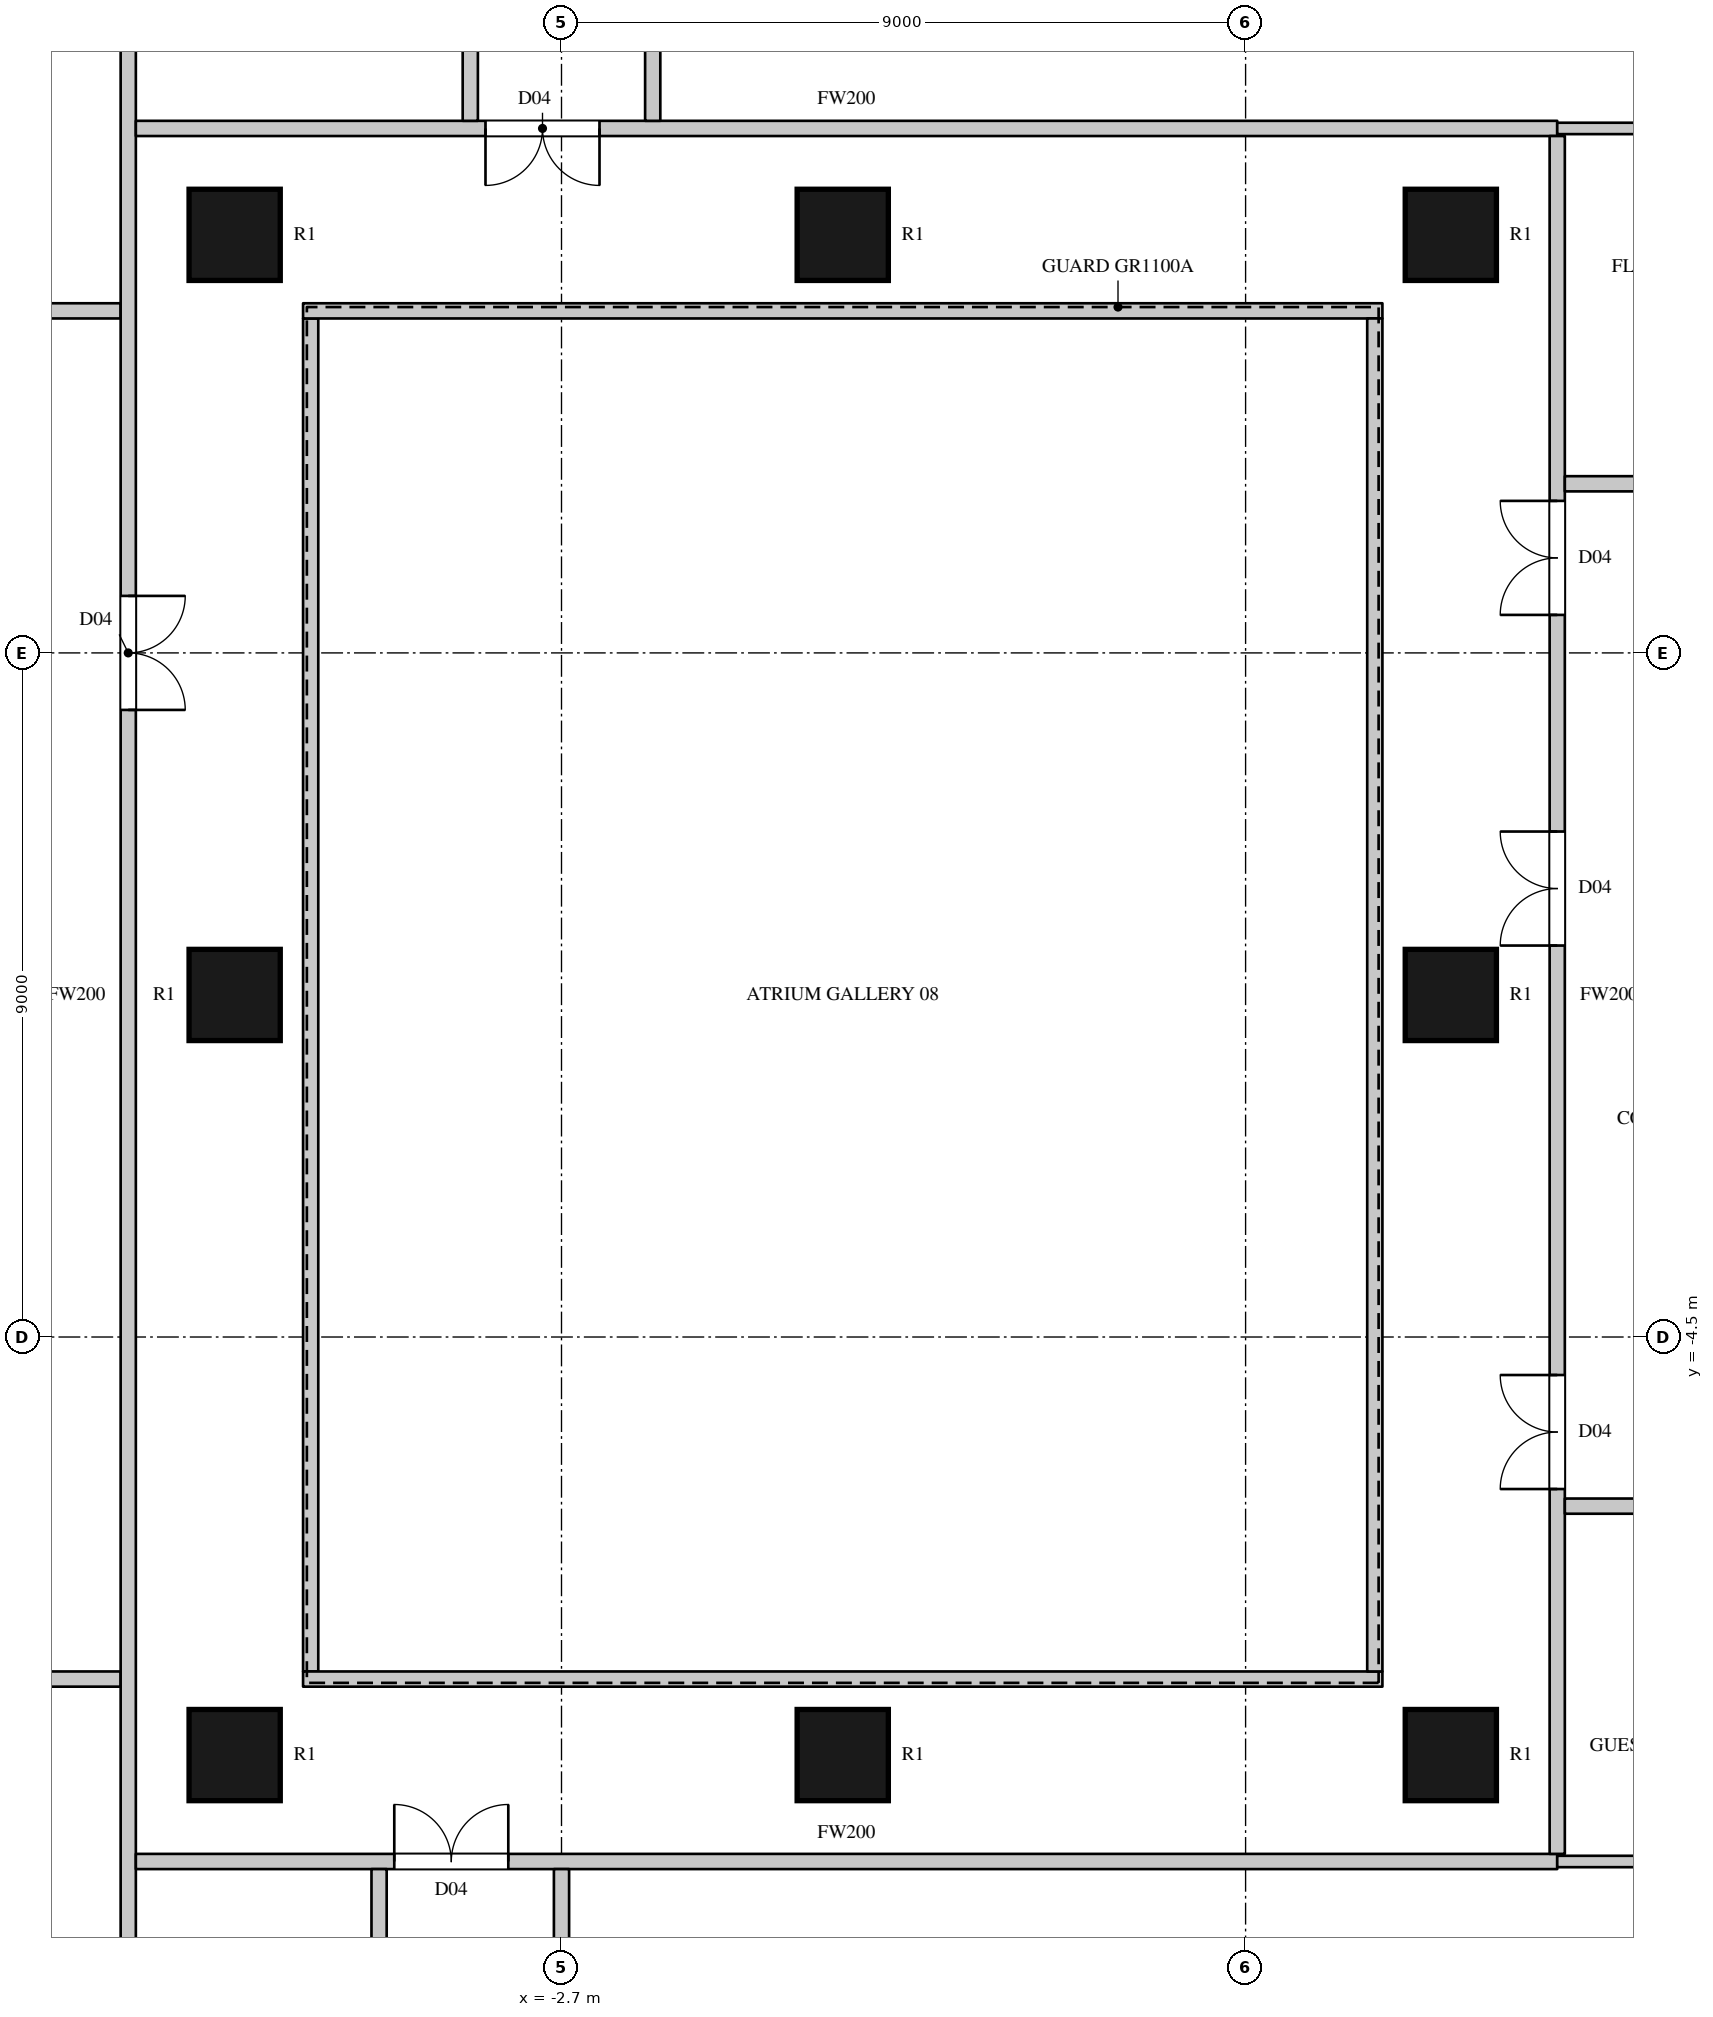
"""IFC4 building model, lengths in metres.
Left out: names, types, materials, properties, quantities, classifications, styles, units other than length and angle.
Written with IfcOpenShell. Run it as: python <this file> out.ifc"""

import sys

from ifc_helpers import new_model, si_unit, direction, frame, frame_2d, origin, origin_2d, place, context, subcontext, project, spatial, rectangle, circle, extrude, element, fill, save


model = new_model("IFC4")
c1 = context("Model", 3, precision=1e-05, world=origin(), true_north=direction((0.0, 1.0)))
c2 = subcontext(c1, "Body", "Model", "MODEL_VIEW")
j1 = project(units=[si_unit("LENGTHUNIT", "METRE"), si_unit("PLANEANGLEUNIT", "RADIAN")], contexts=[c1])
p1 = place(None, origin())
s1 = spatial("IfcSite", under=j1, at=p1, CompositionType="ELEMENT")
p2 = place(p1, origin())
s2 = spatial("IfcBuilding", under=s1, at=p2, CompositionType="ELEMENT")
p3 = place(p2, frame((0.0, 0.0, 59.1)))
s3 = spatial("IfcBuildingStorey", under=s2, at=p3, CompositionType="ELEMENT", Elevation=59.1)
for number, where, z_axis, x_axis in (
    (1, (-7.0, -10.0, 0.0), (0.0, 0.0, 1.0), (1.0, 0.0, 0.0)),
    (2, (-7.0, 0.0, 0.0), (0.0, 0.0, 1.0), (1.0, 0.0, 0.0)),
    (3, (-7.0, 10.0, 0.0), (0.0, 0.0, 1.0), (1.0, 0.0, 0.0)),
    (4, (1.0, -10.0, 0.0), (0.0, 0.0, 1.0), (1.0, 0.0, 0.0)),
    (5, (1.0, 10.0, 0.0), (0.0, 0.0, 1.0), (1.0, 0.0, 0.0)),
    (6, (9.0, -10.0, 0.0), (0.0, 0.0, 1.0), (1.0, 0.0, 0.0)),
    (7, (9.0, 0.0, 0.0), (0.0, 0.0, 1.0), (1.0, 0.0, 0.0)),
    (8, (9.0, 10.0, 0.0), (0.0, 0.0, 1.0), (1.0, 0.0, 0.0)),
):
    element("IfcColumn", number, at=place(p3, frame(where, z_axis=z_axis, x_axis=x_axis)), inside=s3, PredefinedType="COLUMN", context=c2, shape_type="SweptSolid", body=[
        extrude(circle(Radius=0.6, at=origin_2d()), origin(), (0.0, 0.0, 1.0), 3.6),
    ])
p4 = place(p3, frame((-13.97, -9.0, 0.0), z_axis=(0.0, 0.0, 1.0), x_axis=(1.0, 0.0, 0.0)))
e9 = element("IfcWall", 9, at=p4, inside=s3, PredefinedType="PARTITIONING", context=c2, shape_type="SweptSolid", body=[
    extrude(rectangle(XDim=5.47, YDim=0.2, at=frame_2d((2.735, 0.0))), origin(), (0.0, 0.0, 1.0), 3.3),
])
p5 = place(p4, frame((0.4, 0.0, 0.0)))
e10 = element("IfcOpeningElement", 10, at=p5, cuts=e9, PredefinedType="OPENING", context=c2, shape_type="SweptSolid", body=[
    extrude(rectangle(XDim=1.5, YDim=2.2, at=frame_2d((0.75, 1.1))), frame((0.0, 0.11, 0.0), z_axis=(0.0, -1.0, 0.0), x_axis=(1.0, 0.0, 0.0)), (0.0, 0.0, 1.0), 0.22),
])
p6 = place(p4, frame((2.05, 0.0, 0.0)))
e11 = element("IfcOpeningElement", 11, at=p6, cuts=e9, PredefinedType="OPENING", context=c2, shape_type="SweptSolid", body=[
    extrude(rectangle(XDim=1.5, YDim=2.2, at=frame_2d((0.75, 1.1))), frame((0.0, 0.11, 0.0), z_axis=(0.0, -1.0, 0.0), x_axis=(1.0, 0.0, 0.0)), (0.0, 0.0, 1.0), 0.22),
])
p7 = place(p3, frame((-13.97, 9.0, 0.0), z_axis=(0.0, 0.0, 1.0), x_axis=(1.0, 0.0, 0.0)))
e12 = element("IfcWall", 12, at=p7, inside=s3, PredefinedType="PARTITIONING", context=c2, shape_type="SweptSolid", body=[
    extrude(rectangle(XDim=5.47, YDim=0.2, at=frame_2d((2.735, 0.0))), origin(), (0.0, 0.0, 1.0), 3.3),
])
p8 = place(p3, frame((-8.4, -15.3, 0.0), z_axis=(0.0, 0.0, 1.0), x_axis=(0.0, 1.0, 0.0)))
e13 = element("IfcWall", 13, at=p8, inside=s3, PredefinedType="PARTITIONING", context=c2, shape_type="SweptSolid", body=[
    extrude(rectangle(XDim=30.6, YDim=0.2, at=frame_2d((15.3, 0.0))), origin(), (0.0, 0.0, 1.0), 3.3),
])
p9 = place(p8, frame((19.05, 0.0, 0.0)))
e14 = element("IfcOpeningElement", 14, at=p9, cuts=e13, PredefinedType="OPENING", context=c2, shape_type="SweptSolid", body=[
    extrude(rectangle(XDim=1.5, YDim=2.2, at=frame_2d((0.75, 1.1))), frame((0.0, 0.11, 0.0), z_axis=(0.0, -1.0, 0.0), x_axis=(1.0, 0.0, 0.0)), (0.0, 0.0, 1.0), 0.22),
])
p10 = place(p8, frame((29.55, 0.0, 0.0)))
e15 = element("IfcOpeningElement", 15, at=p10, cuts=e13, PredefinedType="OPENING", context=c2, shape_type="SweptSolid", body=[
    extrude(rectangle(XDim=0.9, YDim=2.2, at=frame_2d((0.45, 1.1))), frame((0.0, 0.11, 0.0), z_axis=(0.0, -1.0, 0.0), x_axis=(1.0, 0.0, 0.0)), (0.0, 0.0, 1.0), 0.22),
])
p11 = place(p8, frame((0.15, 0.0, 0.0)))
e16 = element("IfcOpeningElement", 16, at=p11, cuts=e13, PredefinedType="OPENING", context=c2, shape_type="SweptSolid", body=[
    extrude(rectangle(XDim=0.9, YDim=2.2, at=frame_2d((0.45, 1.1))), frame((0.0, 0.11, 0.0), z_axis=(0.0, -1.0, 0.0), x_axis=(1.0, 0.0, 0.0)), (0.0, 0.0, 1.0), 0.22),
])
p12 = place(p3, frame((-8.3, -11.4, 0.0), z_axis=(0.0, 0.0, 1.0), x_axis=(1.0, 0.0, 0.0)))
e17 = element("IfcWall", 17, at=p12, inside=s3, PredefinedType="PARTITIONING", context=c2, shape_type="SweptSolid", body=[
    extrude(rectangle(XDim=18.7, YDim=0.2, at=frame_2d((9.35, 0.0))), origin(), (0.0, 0.0, 1.0), 3.3),
])
p13 = place(p12, frame((3.4, 0.0, 0.0)))
e18 = element("IfcOpeningElement", 18, at=p13, cuts=e17, PredefinedType="OPENING", context=c2, shape_type="SweptSolid", body=[
    extrude(rectangle(XDim=1.5, YDim=2.2, at=frame_2d((0.75, 1.1))), frame((0.0, 0.11, 0.0), z_axis=(0.0, -1.0, 0.0), x_axis=(1.0, 0.0, 0.0)), (0.0, 0.0, 1.0), 0.22),
])
p14 = place(p3, frame((-8.3, 11.4, 0.0), z_axis=(0.0, 0.0, 1.0), x_axis=(1.0, 0.0, 0.0)))
e19 = element("IfcWall", 19, at=p14, inside=s3, PredefinedType="PARTITIONING", context=c2, shape_type="SweptSolid", body=[
    extrude(rectangle(XDim=18.7, YDim=0.2, at=frame_2d((9.35, 0.0))), origin(), (0.0, 0.0, 1.0), 3.3),
])
p15 = place(p14, frame((4.6, 0.0, 0.0)))
e20 = element("IfcOpeningElement", 20, at=p15, cuts=e19, PredefinedType="OPENING", context=c2, shape_type="SweptSolid", body=[
    extrude(rectangle(XDim=1.5, YDim=2.2, at=frame_2d((0.75, 1.1))), frame((0.0, 0.11, 0.0), z_axis=(0.0, -1.0, 0.0), x_axis=(1.0, 0.0, 0.0)), (0.0, 0.0, 1.0), 0.22),
])
p16 = place(p3, frame((-6.0, -8.9, 0.0), z_axis=(0.0, 0.0, 1.0), x_axis=(0.0, 1.0, 0.0)))
e21 = element("IfcWall", 21, at=p16, inside=s3, PredefinedType="PARTITIONING", context=c2, shape_type="SweptSolid", body=[
    extrude(rectangle(XDim=17.8, YDim=0.2, at=frame_2d((8.9, 0.0))), origin(), (0.0, 0.0, 1.0), 3.3),
])
for number, where, z_axis, x_axis in (
    (22, (-6.1, -9.0, 0.0), (0.0, 0.0, 1.0), (1.0, 0.0, 0.0)),
    (23, (-6.1, 9.0, 0.0), (0.0, 0.0, 1.0), (1.0, 0.0, 0.0)),
):
    element("IfcWall", number, at=place(p3, frame(where, z_axis=z_axis, x_axis=x_axis)), inside=s3, PredefinedType="PARTITIONING", context=c2, shape_type="SweptSolid", body=[
        extrude(rectangle(XDim=14.2, YDim=0.2, at=frame_2d((7.1, 0.0))), origin(), (0.0, 0.0, 1.0), 3.3),
    ])
for number, where, z_axis, x_axis in (
    (24, (-5.1, -15.3, 0.0), (0.0, 0.0, 1.0), (0.0, 1.0, 0.0)),
    (25, (-3.9, 11.5, 0.0), (0.0, 0.0, 1.0), (0.0, 1.0, 0.0)),
):
    element("IfcWall", number, at=place(p3, frame(where, z_axis=z_axis, x_axis=x_axis)), inside=s3, PredefinedType="PARTITIONING", context=c2, shape_type="SweptSolid", body=[
        extrude(rectangle(XDim=3.8, YDim=0.2, at=frame_2d((1.9, 0.0))), origin(), (0.0, 0.0, 1.0), 3.3),
    ])
p17 = place(p3, frame((-2.7, -15.3, 0.0), z_axis=(0.0, 0.0, 1.0), x_axis=(0.0, 1.0, 0.0)))
e26 = element("IfcWall", 26, at=p17, inside=s3, PredefinedType="PARTITIONING", context=c2, shape_type="SweptSolid", body=[
    extrude(rectangle(XDim=3.8, YDim=0.2, at=frame_2d((1.9, 0.0))), origin(), (0.0, 0.0, 1.0), 2.75),
])
p18 = place(p17, frame((0.15, 0.0, 0.0)))
e27 = element("IfcOpeningElement", 27, at=p18, cuts=e26, PredefinedType="OPENING", context=c2, shape_type="SweptSolid", body=[
    extrude(rectangle(XDim=0.9, YDim=2.2, at=frame_2d((0.45, 1.1))), frame((0.0, 0.11, 0.0), z_axis=(0.0, -1.0, 0.0), x_axis=(1.0, 0.0, 0.0)), (0.0, 0.0, 1.0), 0.22),
])
p19 = place(p3, frame((-1.5, 11.5, 0.0), z_axis=(0.0, 0.0, 1.0), x_axis=(0.0, 1.0, 0.0)))
e28 = element("IfcWall", 28, at=p19, inside=s3, PredefinedType="PARTITIONING", context=c2, shape_type="SweptSolid", body=[
    extrude(rectangle(XDim=3.8, YDim=0.2, at=frame_2d((1.9, 0.0))), origin(), (0.0, 0.0, 1.0), 3.3),
])
p20 = place(p19, frame((2.75, 0.0, 0.0)))
e29 = element("IfcOpeningElement", 29, at=p20, cuts=e28, PredefinedType="OPENING", context=c2, shape_type="SweptSolid", body=[
    extrude(rectangle(XDim=0.9, YDim=2.2, at=frame_2d((0.45, 1.1))), frame((0.0, 0.11, 0.0), z_axis=(0.0, -1.0, 0.0), x_axis=(1.0, 0.0, 0.0)), (0.0, 0.0, 1.0), 0.22),
])
p21 = place(p3, frame((8.0, -8.9, 0.0), z_axis=(0.0, 0.0, 1.0), x_axis=(0.0, 1.0, 0.0)))
e30 = element("IfcWall", 30, at=p21, inside=s3, PredefinedType="PARTITIONING", context=c2, shape_type="SweptSolid", body=[
    extrude(rectangle(XDim=17.8, YDim=0.2, at=frame_2d((8.9, 0.0))), origin(), (0.0, 0.0, 1.0), 3.3),
])
p22 = place(p3, frame((10.4, -11.3, 0.0), z_axis=(0.0, 0.0, 1.0), x_axis=(0.0, 1.0, 0.0)))
e31 = element("IfcWall", 31, at=p22, inside=s3, PredefinedType="PARTITIONING", context=c2, shape_type="SweptSolid", body=[
    extrude(rectangle(XDim=22.6, YDim=0.2, at=frame_2d((11.3, 0.0))), origin(), (0.0, 0.0, 1.0), 3.3),
])
p23 = place(p22, frame((4.8, 0.0, 0.0)))
e32 = element("IfcOpeningElement", 32, at=p23, cuts=e31, PredefinedType="OPENING", context=c2, shape_type="SweptSolid", body=[
    extrude(rectangle(XDim=1.5, YDim=2.2, at=frame_2d((0.75, 1.1))), frame((0.0, 0.11, 0.0), z_axis=(0.0, -1.0, 0.0), x_axis=(1.0, 0.0, 0.0)), (0.0, 0.0, 1.0), 0.22),
])
p24 = place(p22, frame((16.3, 0.0, 0.0)))
e33 = element("IfcOpeningElement", 33, at=p24, cuts=e31, PredefinedType="OPENING", context=c2, shape_type="SweptSolid", body=[
    extrude(rectangle(XDim=1.5, YDim=2.2, at=frame_2d((0.75, 1.1))), frame((0.0, 0.11, 0.0), z_axis=(0.0, -1.0, 0.0), x_axis=(1.0, 0.0, 0.0)), (0.0, 0.0, 1.0), 0.22),
])
p25 = place(p22, frame((11.95, 0.0, 0.0)))
e34 = element("IfcOpeningElement", 34, at=p25, cuts=e31, PredefinedType="OPENING", context=c2, shape_type="SweptSolid", body=[
    extrude(rectangle(XDim=1.5, YDim=2.2, at=frame_2d((0.75, 1.1))), frame((0.0, 0.11, 0.0), z_axis=(0.0, -1.0, 0.0), x_axis=(1.0, 0.0, 0.0)), (0.0, 0.0, 1.0), 0.22),
])
p26 = place(p3, frame((10.5, -6.725, 0.0), z_axis=(0.0, 0.0, 1.0), x_axis=(1.0, 0.0, 0.0)))
e35 = element("IfcWall", 35, at=p26, inside=s3, PredefinedType="PARTITIONING", context=c2, shape_type="SweptSolid", body=[
    extrude(rectangle(XDim=3.6, YDim=0.2, at=frame_2d((1.8, 0.0))), origin(), (0.0, 0.0, 1.0), 3.3),
])
p27 = place(p26, frame((1.65, 0.0, 0.0)))
e36 = element("IfcOpeningElement", 36, at=p27, cuts=e35, PredefinedType="OPENING", context=c2, shape_type="SweptSolid", body=[
    extrude(rectangle(XDim=1.6, YDim=2.4, at=frame_2d((0.8, 1.2))), frame((0.0, 0.11, 0.0), z_axis=(0.0, -1.0, 0.0), x_axis=(1.0, 0.0, 0.0)), (0.0, 0.0, 1.0), 0.22),
])
p28 = place(p3, frame((10.5, 6.725, 0.0), z_axis=(0.0, 0.0, 1.0), x_axis=(1.0, 0.0, 0.0)))
e37 = element("IfcWall", 37, at=p28, inside=s3, PredefinedType="PARTITIONING", context=c2, shape_type="SweptSolid", body=[
    extrude(rectangle(XDim=3.6, YDim=0.2, at=frame_2d((1.8, 0.0))), origin(), (0.0, 0.0, 1.0), 3.3),
])
p29 = place(p28, frame((2.3, 0.0, 0.0)))
e38 = element("IfcOpeningElement", 38, at=p29, cuts=e37, PredefinedType="OPENING", context=c2, shape_type="SweptSolid", body=[
    extrude(rectangle(XDim=0.95, YDim=2.2, at=frame_2d((0.475, 1.1))), frame((0.0, 0.11, 0.0), z_axis=(0.0, -1.0, 0.0), x_axis=(1.0, 0.0, 0.0)), (0.0, 0.0, 1.0), 0.22),
])
for number, where, z_axis, x_axis in (
    (39, (10.4, -11.4, 0.0), (0.0, 0.0, 1.0), (1.0, 0.0, 0.0)),
    (40, (10.4, 11.4, 0.0), (0.0, 0.0, 1.0), (1.0, 0.0, 0.0)),
):
    element("IfcWall", number, at=place(p3, frame(where, z_axis=z_axis, x_axis=x_axis)), inside=s3, PredefinedType="PARTITIONING", context=c2, shape_type="SweptSolid", body=[
        extrude(rectangle(XDim=3.5, YDim=0.15, at=frame_2d((1.75, 0.0))), origin(), (0.0, 0.0, 1.0), 3.3),
    ])
p30 = place(p9, origin())
e41 = element("IfcDoor", 41, at=p30, inside=s3, OperationType="DOUBLE_DOOR_SINGLE_SWING", PredefinedType="DOOR", context=c2, shape_type="SweptSolid", body=[
    extrude(rectangle(XDim=1.5, YDim=2.2, at=frame_2d((0.75, 1.1))), frame((0.0, 0.025, 0.0), z_axis=(0.0, -1.0, 0.0), x_axis=(1.0, 0.0, 0.0)), (0.0, 0.0, 1.0), 0.05),
])
fill(e14, e41)
p31 = place(p13, origin())
e42 = element("IfcDoor", 42, at=p31, inside=s3, OperationType="DOUBLE_DOOR_SINGLE_SWING", PredefinedType="DOOR", context=c2, shape_type="SweptSolid", body=[
    extrude(rectangle(XDim=1.5, YDim=2.2, at=frame_2d((0.75, 1.1))), frame((0.0, 0.025, 0.0), z_axis=(0.0, -1.0, 0.0), x_axis=(1.0, 0.0, 0.0)), (0.0, 0.0, 1.0), 0.05),
])
fill(e18, e42)
p32 = place(p15, origin())
e43 = element("IfcDoor", 43, at=p32, inside=s3, OperationType="DOUBLE_DOOR_SINGLE_SWING", PredefinedType="DOOR", context=c2, shape_type="SweptSolid", body=[
    extrude(rectangle(XDim=1.5, YDim=2.2, at=frame_2d((0.75, 1.1))), frame((0.0, 0.025, 0.0), z_axis=(0.0, -1.0, 0.0), x_axis=(1.0, 0.0, 0.0)), (0.0, 0.0, 1.0), 0.05),
])
fill(e20, e43)
p33 = place(p23, origin())
e44 = element("IfcDoor", 44, at=p33, inside=s3, OperationType="DOUBLE_DOOR_SINGLE_SWING", PredefinedType="DOOR", context=c2, shape_type="SweptSolid", body=[
    extrude(rectangle(XDim=1.5, YDim=2.2, at=frame_2d((0.75, 1.1))), frame((0.0, 0.025, 0.0), z_axis=(0.0, -1.0, 0.0), x_axis=(1.0, 0.0, 0.0)), (0.0, 0.0, 1.0), 0.05),
])
fill(e32, e44)
p34 = place(p24, origin())
e45 = element("IfcDoor", 45, at=p34, inside=s3, OperationType="DOUBLE_DOOR_SINGLE_SWING", PredefinedType="DOOR", context=c2, shape_type="SweptSolid", body=[
    extrude(rectangle(XDim=1.5, YDim=2.2, at=frame_2d((0.75, 1.1))), frame((0.0, 0.025, 0.0), z_axis=(0.0, -1.0, 0.0), x_axis=(1.0, 0.0, 0.0)), (0.0, 0.0, 1.0), 0.05),
])
fill(e33, e45)
p35 = place(p25, origin())
e46 = element("IfcDoor", 46, at=p35, inside=s3, OperationType="DOUBLE_DOOR_SINGLE_SWING", PredefinedType="DOOR", context=c2, shape_type="SweptSolid", body=[
    extrude(rectangle(XDim=1.5, YDim=2.2, at=frame_2d((0.75, 1.1))), frame((0.0, 0.025, 0.0), z_axis=(0.0, -1.0, 0.0), x_axis=(1.0, 0.0, 0.0)), (0.0, 0.0, 1.0), 0.05),
])
fill(e34, e46)
save(model, sys.argv[1])
